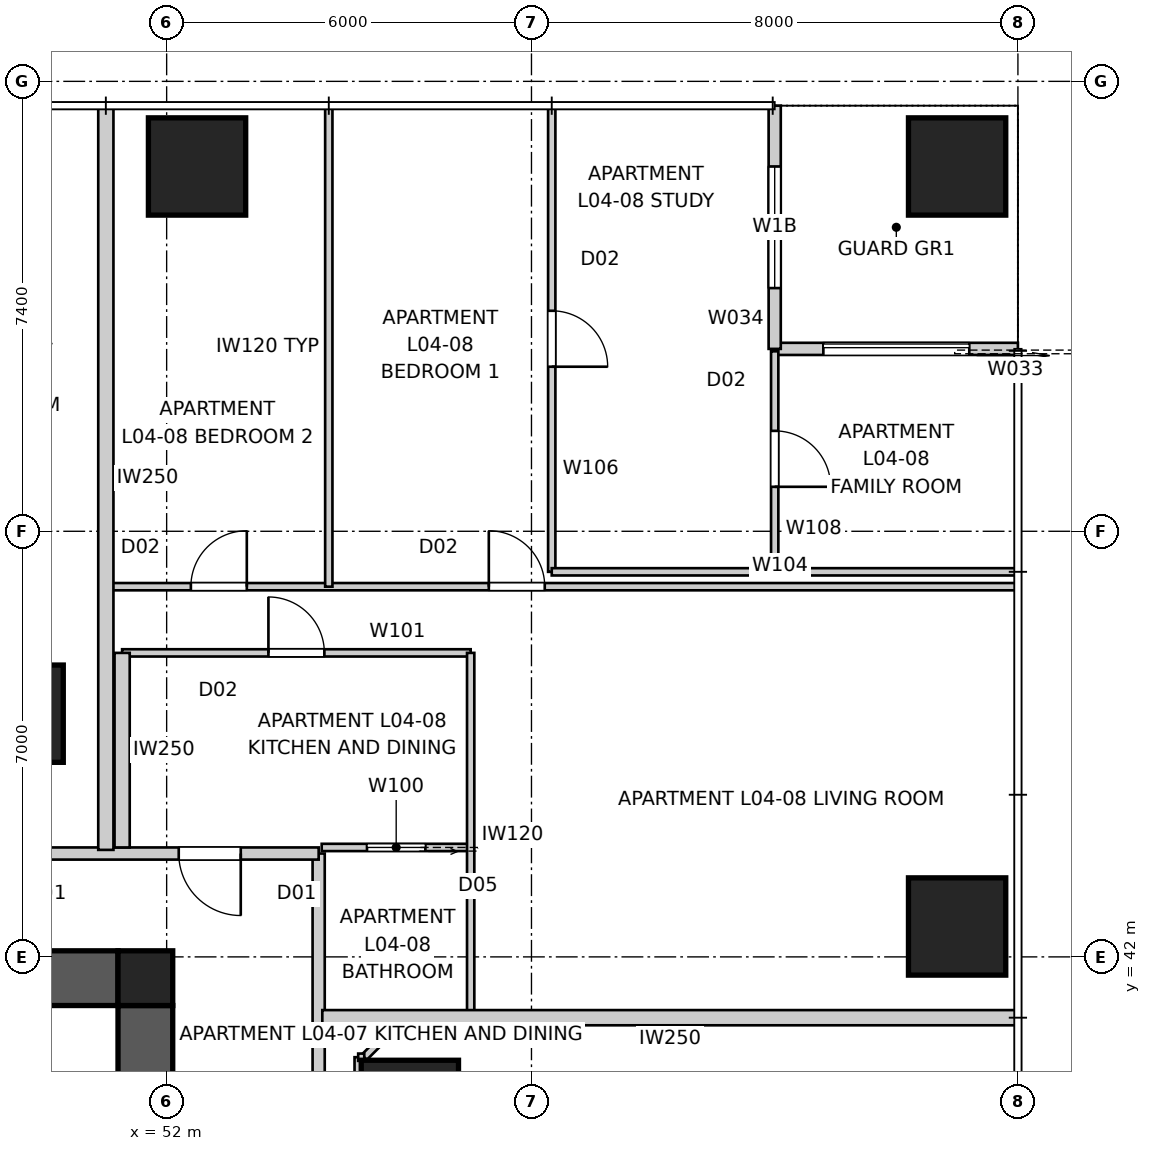
"""IFC4 building model, lengths in metres.
Left out: names, types, materials, properties, quantities, classifications, styles, units other than length and angle.
Written with IfcOpenShell. Run it as: python <this file> out.ifc"""

import sys

from ifc_helpers import new_model, si_unit, direction, frame, frame_2d, origin, origin_2d, place, context, subcontext, project, spatial, polyline, rectangle, outline, extrude, element, fill, save


model = new_model("IFC4")
c1 = context("Model", 3, precision=1e-05, world=origin(), true_north=direction((0.0, 1.0)))
c2 = subcontext(c1, "Body", "Model", "MODEL_VIEW")
j1 = project(units=[si_unit("LENGTHUNIT", "METRE"), si_unit("PLANEANGLEUNIT", "RADIAN")], contexts=[c1])
p1 = place(None, origin())
s1 = spatial("IfcSite", under=j1, at=p1, CompositionType="ELEMENT")
p2 = place(p1, origin())
s2 = spatial("IfcBuilding", under=s1, at=p2, CompositionType="ELEMENT")
p3 = place(p2, frame((0.0, 0.0, 18.4)))
s3 = spatial("IfcBuildingStorey", under=s2, at=p3, CompositionType="ELEMENT", Elevation=18.4)
p4 = place(p3, frame((28.8, 41.65, 0.0), z_axis=(0.0, 0.0, 1.0), x_axis=(1.0, 0.0, 0.0)))
e1 = element("IfcWall", 1, at=p4, inside=s3, PredefinedType="SHEAR", context=c2, shape_type="SweptSolid", body=[
    extrude(outline(polyline([(0.0, -0.45), (22.4, -0.45), (22.4, -0.025), (22.85, -0.025), (22.85, 0.025), (22.4, 0.025), (22.4, 0.45), (0.0, 0.45), (0.0, 0.025), (-0.45, 0.025), (-0.45, -0.025), (0.0, -0.025), (0.0, -0.45)])), origin(), (0.0, 0.0, 1.0), 3.4),
])
p5 = place(p3, frame((51.65, 18.8, 0.0), z_axis=(0.0, 0.0, 1.0), x_axis=(0.0, 1.0, 0.0)))
e2 = element("IfcWall", 2, at=p5, inside=s3, PredefinedType="SHEAR", context=c2, shape_type="SweptSolid", body=[
    extrude(outline(polyline([(0.0, -0.45), (22.4, -0.45), (22.4, -0.025), (22.85, -0.025), (22.85, 0.025), (22.4, 0.025), (22.4, 0.45), (0.0, 0.45), (0.0, 0.025), (-0.45, 0.025), (-0.45, -0.025), (0.0, -0.025), (0.0, -0.45)])), origin(), (0.0, 0.0, 1.0), 3.4),
])
p6 = place(p5, frame((11.14, 0.0, 0.0)))
e3 = element("IfcOpeningElement", 3, at=p6, cuts=e2, PredefinedType="OPENING", context=c2, shape_type="SweptSolid", body=[
    extrude(rectangle(XDim=1.02, YDim=2.4, at=frame_2d((0.51, 1.2))), frame((0.0, 0.46, 0.0), z_axis=(0.0, -1.0, 0.0), x_axis=(1.0, 0.0, 0.0)), (0.0, 0.0, 1.0), 0.92),
])
p7 = place(p3, frame((51.65, 41.65, 0.0), z_axis=(0.0, 0.0, 1.0), x_axis=(1.0, 0.0, 0.0)))
e4 = element("IfcColumn", 4, at=p7, inside=s3, PredefinedType="COLUMN", context=c2, shape_type="SweptSolid", body=[
    extrude(rectangle(XDim=0.9, YDim=0.9, at=origin_2d()), origin(), (0.0, 0.0, 1.0), 3.4),
])
for number, where, z_axis, x_axis in (
    (5, (65.0, 42.5, 0.0), (0.0, 0.0, 1.0), (1.0, 0.0, 0.0)),
    (6, (65.0, 55.0, 0.0), (0.0, 0.0, 1.0), (1.0, 0.0, 0.0)),
    (7, (52.5, 55.0, 0.0), (0.0, 0.0, 1.0), (1.0, 0.0, 0.0)),
    (8, (56.0, 39.5, 0.0), (0.0, 0.0, 1.0), (1.0, 0.0, 0.0)),
    (9, (49.5, 46.0, 0.0), (0.0, 0.0, 1.0), (1.0, 0.0, 0.0)),
):
    element("IfcColumn", number, at=place(p3, frame(where, z_axis=z_axis, x_axis=x_axis)), inside=s3, PredefinedType="COLUMN", context=c2, shape_type="SweptSolid", body=[
        extrude(rectangle(XDim=1.6, YDim=1.6, at=origin_2d()), origin(), (0.0, 0.0, 1.0), 3.4),
    ])
p8 = place(p3, frame((66.0, 52.0, 0.0), z_axis=(0.0, 0.0, 1.0), x_axis=(-1.0, 0.0, 0.0)))
e10 = element("IfcWall", 10, at=p8, inside=s3, PredefinedType="SOLIDWALL", context=c2, shape_type="SweptSolid", body=[
    extrude(rectangle(XDim=4.0, YDim=0.2, at=frame_2d((2.0, 0.0))), origin(), (0.0, 0.0, 1.0), 3.25),
])
p9 = place(p8, frame((0.8, 0.0, 0.0)))
e11 = element("IfcOpeningElement", 11, at=p9, cuts=e10, PredefinedType="OPENING", context=c2, shape_type="SweptSolid", body=[
    extrude(rectangle(XDim=2.4, YDim=2.1, at=frame_2d((1.2, 1.05))), frame((0.0, 0.11, 0.0), z_axis=(0.0, -1.0, 0.0), x_axis=(1.0, 0.0, 0.0)), (0.0, 0.0, 1.0), 0.22),
])
p10 = place(p3, frame((62.0, 52.0, 0.0), z_axis=(0.0, 0.0, 1.0), x_axis=(0.0, 1.0, 0.0)))
e12 = element("IfcWall", 12, at=p10, inside=s3, PredefinedType="SOLIDWALL", context=c2, shape_type="SweptSolid", body=[
    extrude(rectangle(XDim=4.0, YDim=0.2, at=frame_2d((2.0, 0.0))), origin(), (0.0, 0.0, 1.0), 3.25),
])
p11 = place(p10, frame((1.0, 0.0, 0.45)))
e13 = element("IfcOpeningElement", 13, at=p11, cuts=e12, PredefinedType="OPENING", context=c2, shape_type="SweptSolid", body=[
    extrude(rectangle(XDim=2.0, YDim=1.8, at=frame_2d((1.0, 0.9))), frame((0.0, 0.11, 0.0), z_axis=(0.0, -1.0, 0.0), x_axis=(1.0, 0.0, 0.0)), (0.0, 0.0, 1.0), 0.22),
])
p12 = place(p3, frame((54.5, 16.3, 0.0), z_axis=(0.0, 0.0, 1.0), x_axis=(0.0, 1.0, 0.0)))
e14 = element("IfcWall", 14, at=p12, inside=s3, PredefinedType="PARTITIONING", context=c2, shape_type="SweptSolid", body=[
    extrude(rectangle(XDim=27.4, YDim=0.2, at=frame_2d((13.7, 0.0))), origin(), (0.0, 0.0, 1.0), 3.25),
])
p13 = place(p12, frame((20.998, 0.0, 0.0)))
e15 = element("IfcOpeningElement", 15, at=p13, cuts=e14, PredefinedType="OPENING", context=c2, shape_type="SweptSolid", body=[
    extrude(rectangle(XDim=1.02, YDim=2.34, at=frame_2d((0.51, 1.17))), frame((0.0, 0.11, 0.0), z_axis=(0.0, -1.0, 0.0), x_axis=(1.0, 0.0, 0.0)), (0.0, 0.0, 1.0), 0.22),
])
p14 = place(p12, frame((11.119, 0.0, 0.0)))
e16 = element("IfcOpeningElement", 16, at=p14, cuts=e14, PredefinedType="OPENING", context=c2, shape_type="SweptSolid", body=[
    extrude(rectangle(XDim=1.02, YDim=2.34, at=frame_2d((0.51, 1.17))), frame((0.0, 0.11, 0.0), z_axis=(0.0, -1.0, 0.0), x_axis=(1.0, 0.0, 0.0)), (0.0, 0.0, 1.0), 0.22),
])
p15 = place(p12, frame((1.015, 0.0, 0.0)))
e17 = element("IfcOpeningElement", 17, at=p15, cuts=e14, PredefinedType="OPENING", context=c2, shape_type="SweptSolid", body=[
    extrude(rectangle(XDim=1.02, YDim=2.34, at=frame_2d((0.51, 1.17))), frame((0.0, 0.11, 0.0), z_axis=(0.0, -1.0, 0.0), x_axis=(1.0, 0.0, 0.0)), (0.0, 0.0, 1.0), 0.22),
])
p16 = place(p3, frame((54.5, 43.7, 0.0), z_axis=(0.0, 0.0, 1.0), x_axis=(-1.0, 0.0, 0.0)))
e18 = element("IfcWall", 18, at=p16, inside=s3, PredefinedType="PARTITIONING", context=c2, shape_type="SweptSolid", body=[
    extrude(rectangle(XDim=29.0, YDim=0.2, at=frame_2d((14.5, 0.0))), origin(), (0.0, 0.0, 1.0), 3.25),
])
p17 = place(p16, frame((22.253, 0.0, 0.0)))
e19 = element("IfcOpeningElement", 19, at=p17, cuts=e18, PredefinedType="OPENING", context=c2, shape_type="SweptSolid", body=[
    extrude(rectangle(XDim=1.02, YDim=2.34, at=frame_2d((0.51, 1.17))), frame((0.0, 0.11, 0.0), z_axis=(0.0, -1.0, 0.0), x_axis=(1.0, 0.0, 0.0)), (0.0, 0.0, 1.0), 0.22),
])
p18 = place(p16, frame((5.393, 0.0, 0.0)))
e20 = element("IfcOpeningElement", 20, at=p18, cuts=e18, PredefinedType="OPENING", context=c2, shape_type="SweptSolid", body=[
    extrude(rectangle(XDim=1.02, YDim=2.34, at=frame_2d((0.51, 1.17))), frame((0.0, 0.11, 0.0), z_axis=(0.0, -1.0, 0.0), x_axis=(1.0, 0.0, 0.0)), (0.0, 0.0, 1.0), 0.22),
])
p19 = place(p16, frame((1.281, 0.0, 0.0)))
e21 = element("IfcOpeningElement", 21, at=p19, cuts=e18, PredefinedType="OPENING", context=c2, shape_type="SweptSolid", body=[
    extrude(rectangle(XDim=1.02, YDim=2.34, at=frame_2d((0.51, 1.17))), frame((0.0, 0.11, 0.0), z_axis=(0.0, -1.0, 0.0), x_axis=(1.0, 0.0, 0.0)), (0.0, 0.0, 1.0), 0.22),
])
p20 = place(p3, frame((66.0, 41.0, 0.0), z_axis=(0.0, 0.0, 1.0), x_axis=(-1.0, 0.0, 0.0)))
e22 = element("IfcWall", 22, at=p20, inside=s3, PredefinedType="PARTITIONING", context=c2, shape_type="SweptSolid", body=[
    extrude(rectangle(XDim=11.44, YDim=0.25, at=frame_2d((5.72, 0.0))), origin(), (0.0, 0.0, 1.0), 3.25),
])
p21 = place(p3, frame((51.0, 56.0, 0.0), z_axis=(0.0, 0.0, 1.0), x_axis=(0.0, -1.0, 0.0)))
e23 = element("IfcWall", 23, at=p21, inside=s3, PredefinedType="PARTITIONING", context=c2, shape_type="SweptSolid", body=[
    extrude(rectangle(XDim=12.24, YDim=0.25, at=frame_2d((6.12, 0.0))), origin(), (0.0, 0.0, 1.0), 3.25),
])
p22 = place(p3, frame((55.9, 41.0, 0.0), z_axis=(0.0, 0.0, 1.0), x_axis=(-0.707106781187, -0.707106781187, 0.0)))
e24 = element("IfcWall", 24, at=p22, inside=s3, PredefinedType="PARTITIONING", context=c2, shape_type="SweptSolid", body=[
    extrude(rectangle(XDim=0.919, YDim=0.12, at=frame_2d((0.459, 0.0))), origin(), (0.0, 0.0, 1.0), 3.25),
])
p23 = place(p3, frame((55.15, 40.35, 0.0), z_axis=(0.0, 0.0, 1.0), x_axis=(0.0, -1.0, 0.0)))
e25 = element("IfcWall", 25, at=p23, inside=s3, PredefinedType="PARTITIONING", context=c2, shape_type="SweptSolid", body=[
    extrude(rectangle(XDim=1.7, YDim=0.12, at=frame_2d((0.85, 0.0))), origin(), (0.0, 0.0, 1.0), 3.25),
])
p24 = place(p3, frame((57.0, 43.8, 0.0), z_axis=(0.0, 0.0, 1.0), x_axis=(-1.0, 0.0, 0.0)))
e26 = element("IfcWall", 26, at=p24, inside=s3, PredefinedType="PARTITIONING", context=c2, shape_type="SweptSolid", body=[
    extrude(rectangle(XDim=2.45, YDim=0.12, at=frame_2d((1.225, 0.0))), origin(), (0.0, 0.0, 1.0), 3.25),
])
p25 = place(p24, frame((0.745, 0.0, 0.0)))
e27 = element("IfcOpeningElement", 27, at=p25, cuts=e26, PredefinedType="OPENING", context=c2, shape_type="SweptSolid", body=[
    extrude(rectangle(XDim=0.96, YDim=2.1, at=frame_2d((0.48, 1.05))), frame((0.0, 0.07, 0.0), z_axis=(0.0, -1.0, 0.0), x_axis=(1.0, 0.0, 0.0)), (0.0, 0.0, 1.0), 0.14),
])
p26 = place(p3, frame((51.268, 47.0, 0.0), z_axis=(0.0, 0.0, 1.0), x_axis=(1.0, 0.0, 0.0)))
e28 = element("IfcWall", 28, at=p26, inside=s3, PredefinedType="PARTITIONING", context=c2, shape_type="SweptSolid", body=[
    extrude(rectangle(XDim=5.732, YDim=0.12, at=frame_2d((2.866, 0.0))), origin(), (0.0, 0.0, 1.0), 3.25),
])
p27 = place(p26, frame((2.406, 0.0, 0.0)))
e29 = element("IfcOpeningElement", 29, at=p27, cuts=e28, PredefinedType="OPENING", context=c2, shape_type="SweptSolid", body=[
    extrude(rectangle(XDim=0.92, YDim=2.34, at=frame_2d((0.46, 1.17))), frame((0.0, 0.07, 0.0), z_axis=(0.0, -1.0, 0.0), x_axis=(1.0, 0.0, 0.0)), (0.0, 0.0, 1.0), 0.14),
])
p28 = place(p3, frame((57.0, 47.0, 0.0), z_axis=(0.0, 0.0, 1.0), x_axis=(0.0, -1.0, 0.0)))
e30 = element("IfcWall", 30, at=p28, inside=s3, PredefinedType="PARTITIONING", context=c2, shape_type="SweptSolid", body=[
    extrude(rectangle(XDim=6.0, YDim=0.12, at=frame_2d((3.0, 0.0))), origin(), (0.0, 0.0, 1.0), 3.25),
])
p29 = place(p3, frame((51.268, 43.8, 0.0), z_axis=(0.0, 0.0, 1.0), x_axis=(0.0, 1.0, 0.0)))
e31 = element("IfcWall", 31, at=p29, inside=s3, PredefinedType="PARTITIONING", context=c2, shape_type="SweptSolid", body=[
    extrude(rectangle(XDim=3.2, YDim=0.25, at=frame_2d((1.6, 0.0))), origin(), (0.0, 0.0, 1.0), 3.25),
])
p30 = place(p3, frame((51.0, 48.089, 0.0), z_axis=(0.0, 0.0, 1.0), x_axis=(1.0, 0.0, 0.0)))
e32 = element("IfcWall", 32, at=p30, inside=s3, PredefinedType="PARTITIONING", context=c2, shape_type="SweptSolid", body=[
    extrude(rectangle(XDim=14.96, YDim=0.12, at=frame_2d((7.48, 0.0))), origin(), (0.0, 0.0, 1.0), 3.25),
])
p31 = place(p30, frame((6.298, 0.0, 0.0)))
e33 = element("IfcOpeningElement", 33, at=p31, cuts=e32, PredefinedType="OPENING", context=c2, shape_type="SweptSolid", body=[
    extrude(rectangle(XDim=0.92, YDim=2.34, at=frame_2d((0.46, 1.17))), frame((0.0, 0.07, 0.0), z_axis=(0.0, -1.0, 0.0), x_axis=(1.0, 0.0, 0.0)), (0.0, 0.0, 1.0), 0.14),
])
p32 = place(p30, frame((1.398, 0.0, 0.0)))
e34 = element("IfcOpeningElement", 34, at=p32, cuts=e32, PredefinedType="OPENING", context=c2, shape_type="SweptSolid", body=[
    extrude(rectangle(XDim=0.92, YDim=2.34, at=frame_2d((0.46, 1.17))), frame((0.0, 0.07, 0.0), z_axis=(0.0, -1.0, 0.0), x_axis=(1.0, 0.0, 0.0)), (0.0, 0.0, 1.0), 0.14),
])
p33 = place(p3, frame((54.667, 48.089, 0.0), z_axis=(0.0, 0.0, 1.0), x_axis=(0.0, 1.0, 0.0)))
e35 = element("IfcWall", 35, at=p33, inside=s3, PredefinedType="PARTITIONING", context=c2, shape_type="SweptSolid", body=[
    extrude(rectangle(XDim=7.871, YDim=0.12, at=frame_2d((3.936, 0.0))), origin(), (0.0, 0.0, 1.0), 2.638),
])
p34 = place(p3, frame((58.333, 55.96, 0.0), z_axis=(0.0, 0.0, 1.0), x_axis=(0.0, -1.0, 0.0)))
e36 = element("IfcWall", 36, at=p34, inside=s3, PredefinedType="PARTITIONING", context=c2, shape_type="SweptSolid", body=[
    extrude(rectangle(XDim=7.627, YDim=0.12, at=frame_2d((3.813, 0.0))), origin(), (0.0, 0.0, 1.0), 3.25),
])
p35 = place(p34, frame((3.333, 0.0, 0.0)))
e37 = element("IfcOpeningElement", 37, at=p35, cuts=e36, PredefinedType="OPENING", context=c2, shape_type="SweptSolid", body=[
    extrude(rectangle(XDim=0.92, YDim=2.34, at=frame_2d((0.46, 1.17))), frame((0.0, 0.07, 0.0), z_axis=(0.0, -1.0, 0.0), x_axis=(1.0, 0.0, 0.0)), (0.0, 0.0, 1.0), 0.14),
])
p36 = place(p3, frame((58.333, 48.333, 0.0), z_axis=(0.0, 0.0, 1.0), x_axis=(1.0, 0.0, 0.0)))
e38 = element("IfcWall", 38, at=p36, inside=s3, PredefinedType="PARTITIONING", context=c2, shape_type="SweptSolid", body=[
    extrude(rectangle(XDim=7.627, YDim=0.12, at=frame_2d((3.813, 0.0))), origin(), (0.0, 0.0, 1.0), 3.25),
])
p37 = place(p3, frame((62.0, 51.96, 0.0), z_axis=(0.0, 0.0, 1.0), x_axis=(0.0, -1.0, 0.0)))
e39 = element("IfcWall", 39, at=p37, inside=s3, PredefinedType="PARTITIONING", context=c2, shape_type="SweptSolid", body=[
    extrude(rectangle(XDim=3.627, YDim=0.12, at=frame_2d((1.813, 0.0))), origin(), (0.0, 0.0, 1.0), 3.25),
])
p38 = place(p37, frame((1.308, 0.0, 0.0)))
e40 = element("IfcOpeningElement", 40, at=p38, cuts=e39, PredefinedType="OPENING", context=c2, shape_type="SweptSolid", body=[
    extrude(rectangle(XDim=0.92, YDim=2.34, at=frame_2d((0.46, 1.17))), frame((0.0, 0.07, 0.0), z_axis=(0.0, -1.0, 0.0), x_axis=(1.0, 0.0, 0.0)), (0.0, 0.0, 1.0), 0.14),
])
p39 = place(p3, frame((55.15, 40.35, 0.0), z_axis=(0.0, 0.0, 1.0), x_axis=(1.0, 0.0, 0.0)))
e41 = element("IfcWall", 41, at=p39, inside=s3, PredefinedType="PARTITIONING", context=c2, shape_type="SweptSolid", body=[
    extrude(rectangle(XDim=0.1, YDim=0.12, at=frame_2d((0.05, 0.0))), origin(), (0.0, 0.0, 1.0), 3.25),
])
p40 = place(p9, origin())
e42 = element("IfcDoor", 42, at=p40, inside=s3, OperationType="SLIDING_TO_LEFT", PredefinedType="DOOR", context=c2, shape_type="SweptSolid", body=[
    extrude(rectangle(XDim=2.4, YDim=2.1, at=frame_2d((1.2, 1.05))), frame((0.0, 0.025, 0.0), z_axis=(0.0, -1.0, 0.0), x_axis=(1.0, 0.0, 0.0)), (0.0, 0.0, 1.0), 0.05),
])
fill(e11, e42)
p41 = place(p11, origin())
e43 = element("IfcWindow", 43, at=p41, inside=s3, PartitioningType="SINGLE_PANEL", PredefinedType="WINDOW", context=c2, shape_type="SweptSolid", body=[
    extrude(rectangle(XDim=2.0, YDim=1.8, at=frame_2d((1.0, 0.9))), frame((0.0, 0.03, 0.0), z_axis=(0.0, -1.0, 0.0), x_axis=(1.0, 0.0, 0.0)), (0.0, 0.0, 1.0), 0.06),
])
fill(e13, e43)
p42 = place(p19, origin())
e44 = element("IfcDoor", 44, at=p42, inside=s3, OperationType="SINGLE_SWING_LEFT", PredefinedType="DOOR", context=c2, shape_type="SweptSolid", body=[
    extrude(rectangle(XDim=1.02, YDim=2.34, at=frame_2d((0.51, 1.17))), frame((0.0, 0.025, 0.0), z_axis=(0.0, -1.0, 0.0), x_axis=(1.0, 0.0, 0.0)), (0.0, 0.0, 1.0), 0.05),
])
fill(e21, e44)
p43 = place(p27, origin())
e45 = element("IfcDoor", 45, at=p43, inside=s3, OperationType="SINGLE_SWING_LEFT", PredefinedType="DOOR", context=c2, shape_type="SweptSolid", body=[
    extrude(rectangle(XDim=0.92, YDim=2.34, at=frame_2d((0.46, 1.17))), frame((0.0, 0.025, 0.0), z_axis=(0.0, -1.0, 0.0), x_axis=(1.0, 0.0, 0.0)), (0.0, 0.0, 1.0), 0.05),
])
fill(e29, e45)
p44 = place(p25, origin())
e46 = element("IfcDoor", 46, at=p44, inside=s3, OperationType="SLIDING_TO_LEFT", PredefinedType="DOOR", context=c2, shape_type="SweptSolid", body=[
    extrude(rectangle(XDim=0.96, YDim=2.1, at=frame_2d((0.48, 1.05))), frame((0.0, 0.025, 0.0), z_axis=(0.0, -1.0, 0.0), x_axis=(1.0, 0.0, 0.0)), (0.0, 0.0, 1.0), 0.05),
])
fill(e27, e46)
p45 = place(p31, origin())
e47 = element("IfcDoor", 47, at=p45, inside=s3, OperationType="SINGLE_SWING_LEFT", PredefinedType="DOOR", context=c2, shape_type="SweptSolid", body=[
    extrude(rectangle(XDim=0.92, YDim=2.34, at=frame_2d((0.46, 1.17))), frame((0.0, 0.025, 0.0), z_axis=(0.0, -1.0, 0.0), x_axis=(1.0, 0.0, 0.0)), (0.0, 0.0, 1.0), 0.05),
])
fill(e33, e47)
p46 = place(p32, origin())
e48 = element("IfcDoor", 48, at=p46, inside=s3, OperationType="SINGLE_SWING_RIGHT", PredefinedType="DOOR", context=c2, shape_type="SweptSolid", body=[
    extrude(rectangle(XDim=0.92, YDim=2.34, at=frame_2d((0.46, 1.17))), frame((0.0, 0.025, 0.0), z_axis=(0.0, -1.0, 0.0), x_axis=(1.0, 0.0, 0.0)), (0.0, 0.0, 1.0), 0.05),
])
fill(e34, e48)
p47 = place(p35, origin())
e49 = element("IfcDoor", 49, at=p47, inside=s3, OperationType="SINGLE_SWING_RIGHT", PredefinedType="DOOR", context=c2, shape_type="SweptSolid", body=[
    extrude(rectangle(XDim=0.92, YDim=2.34, at=frame_2d((0.46, 1.17))), frame((0.0, 0.025, 0.0), z_axis=(0.0, -1.0, 0.0), x_axis=(1.0, 0.0, 0.0)), (0.0, 0.0, 1.0), 0.05),
])
fill(e37, e49)
p48 = place(p38, origin())
e50 = element("IfcDoor", 50, at=p48, inside=s3, OperationType="SINGLE_SWING_RIGHT", PredefinedType="DOOR", context=c2, shape_type="SweptSolid", body=[
    extrude(rectangle(XDim=0.92, YDim=2.34, at=frame_2d((0.46, 1.17))), frame((0.0, 0.025, 0.0), z_axis=(0.0, -1.0, 0.0), x_axis=(1.0, 0.0, 0.0)), (0.0, 0.0, 1.0), 0.05),
])
fill(e40, e50)
save(model, sys.argv[1])
